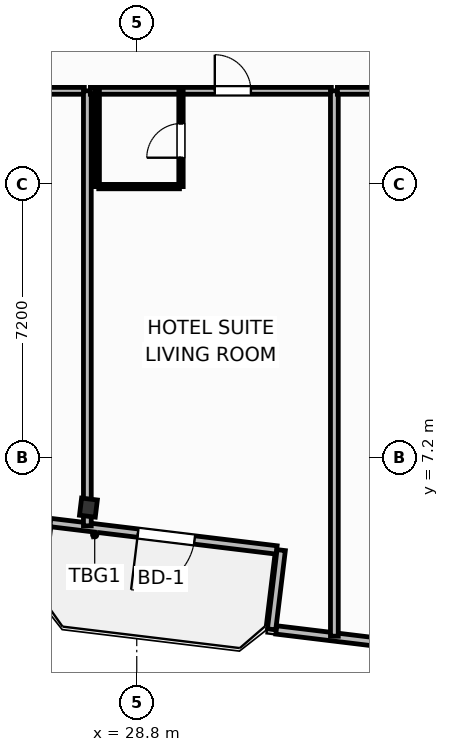
"""IFC4 building model, lengths in metres.
Left out: names, types, materials, properties, quantities, classifications, styles, units other than length and angle.
Written with IfcOpenShell. Run it as: python <this file> out.ifc"""

import sys

from ifc_helpers import new_model, si_unit, direction, frame, frame_2d, origin, origin_2d, place, context, subcontext, project, spatial, rectangle, i_section, extrude, element, fill, save


model = new_model("IFC4")
c1 = context("Model", 3, precision=1e-05, world=origin(), true_north=direction((0.0, 1.0)))
c2 = subcontext(c1, "Body", "Model", "MODEL_VIEW")
j1 = project(units=[si_unit("LENGTHUNIT", "METRE"), si_unit("PLANEANGLEUNIT", "RADIAN")], contexts=[c1])
p1 = place(None, origin())
s1 = spatial("IfcSite", under=j1, at=p1, CompositionType="ELEMENT")
p2 = place(p1, origin())
s2 = spatial("IfcBuilding", under=s1, at=p2, CompositionType="ELEMENT")
p3 = place(p2, frame((0.0, 0.0, 121.7)))
s3 = spatial("IfcBuildingStorey", under=s2, at=p3, CompositionType="ELEMENT", Elevation=121.7)
p4 = place(p3, frame((27.529, 5.884, 0.0), z_axis=(0.0, 0.0, 1.0), x_axis=(0.992732158755, -0.12034475881, 0.0)))
e1 = element("IfcColumn", 1, at=p4, inside=s3, PredefinedType="COLUMN", context=c2, shape_type="SweptSolid", body=[
    extrude(i_section(OverallWidth=0.418, OverallDepth=0.455, WebThickness=0.042, FlangeThickness=0.068, FilletRadius=0.025, at=origin_2d()), origin(), (0.0, 0.0, 1.0), 3.7),
])
p5 = place(p3, frame((32.48, 4.77, 0.0), z_axis=(0.0, 0.0, 1.0), x_axis=(-0.992735402148, 0.120318000826, 0.0)))
e2 = element("IfcWall", 2, at=p5, inside=s3, PredefinedType="SOLIDWALL", context=c2, shape_type="SweptSolid", body=[
    extrude(rectangle(XDim=6.0, YDim=0.22, at=frame_2d((3.0, 0.0))), origin(), (0.0, 0.0, 1.0), 2.73),
])
p6 = place(p5, frame((2.176, 0.0, 0.0)))
e3 = element("IfcOpeningElement", 3, at=p6, cuts=e2, PredefinedType="OPENING", context=c2, shape_type="SweptSolid", body=[
    extrude(rectangle(XDim=1.5, YDim=2.25, at=frame_2d((0.75, 1.125))), frame((0.0, 0.12, 0.0), z_axis=(0.0, -1.0, 0.0), x_axis=(1.0, 0.0, 0.0)), (0.0, 0.0, 1.0), 0.24),
])
p7 = place(p3, frame((32.601, 4.765, 0.0), z_axis=(0.0, 0.0, 1.0), x_axis=(-0.120327895535, -0.992734202874, 0.0)))
e4 = element("IfcWall", 4, at=p7, inside=s3, PredefinedType="SOLIDWALL", context=c2, shape_type="SweptSolid", body=[
    extrude(rectangle(XDim=2.1, YDim=0.22, at=frame_2d((1.05, 0.0))), origin(), (0.0, 0.0, 1.0), 2.73),
])
p8 = place(p3, frame((32.472, 2.665, 0.0), z_axis=(0.0, 0.0, 1.0), x_axis=(0.992734661931, -0.120324108143, 0.0)))
e5 = element("IfcWall", 5, at=p8, inside=s3, PredefinedType="SOLIDWALL", context=c2, shape_type="SweptSolid", body=[
    extrude(rectangle(XDim=8.035, YDim=0.22, at=frame_2d((4.018, 0.0))), origin(), (0.0, 0.0, 1.0), 2.73),
])
p9 = place(p8, frame((3.192, 0.0, 0.8)))
e6 = element("IfcOpeningElement", 6, at=p9, cuts=e5, PredefinedType="OPENING", context=c2, shape_type="SweptSolid", body=[
    extrude(rectangle(XDim=1.65, YDim=1.65, at=frame_2d((0.825, 0.825))), frame((0.0, 0.12, 0.0), z_axis=(0.0, -1.0, 0.0), x_axis=(1.0, 0.0, 0.0)), (0.0, 0.0, 1.0), 0.24),
])
p10 = place(p3, frame((21.08, 16.85, 0.0), z_axis=(0.0, 0.0, 1.0), x_axis=(1.0, 0.0, 0.0)))
e7 = element("IfcWall", 7, at=p10, inside=s3, PredefinedType="PARTITIONING", context=c2, shape_type="SweptSolid", body=[
    extrude(rectangle(XDim=6.34, YDim=0.18, at=frame_2d((3.17, 0.0))), origin(), (0.0, 0.0, 1.0), 3.45),
])
p11 = place(p10, frame((3.274, 0.0, 0.0)))
e8 = element("IfcOpeningElement", 8, at=p11, cuts=e7, PredefinedType="OPENING", context=c2, shape_type="SweptSolid", body=[
    extrude(rectangle(XDim=0.95, YDim=2.15, at=frame_2d((0.475, 1.075))), frame((0.0, 0.1, 0.0), z_axis=(0.0, -1.0, 0.0), x_axis=(1.0, 0.0, 0.0)), (0.0, 0.0, 1.0), 0.2),
])
p12 = place(p3, frame((27.5, 5.403, 0.0), z_axis=(0.0, 0.0, 1.0), x_axis=(0.0, 1.0, 0.0)))
e9 = element("IfcWall", 9, at=p12, inside=s3, PredefinedType="PARTITIONING", context=c2, shape_type="SweptSolid", body=[
    extrude(rectangle(XDim=11.447, YDim=0.205, at=frame_2d((5.723, 0.0))), origin(), (0.0, 0.0, 1.0), 2.662),
])
p13 = place(p3, frame((27.58, 16.85, 0.0), z_axis=(0.0, 0.0, 1.0), x_axis=(1.0, 0.0, 0.0)))
e10 = element("IfcWall", 10, at=p13, inside=s3, PredefinedType="PARTITIONING", context=c2, shape_type="SweptSolid", body=[
    extrude(rectangle(XDim=6.34, YDim=0.18, at=frame_2d((3.17, 0.0))), origin(), (0.0, 0.0, 1.0), 3.45),
])
p14 = place(p13, frame((3.274, 0.0, 0.0)))
e11 = element("IfcOpeningElement", 11, at=p14, cuts=e10, PredefinedType="OPENING", context=c2, shape_type="SweptSolid", body=[
    extrude(rectangle(XDim=0.95, YDim=2.15, at=frame_2d((0.475, 1.075))), frame((0.0, 0.1, 0.0), z_axis=(0.0, -1.0, 0.0), x_axis=(1.0, 0.0, 0.0)), (0.0, 0.0, 1.0), 0.2),
])
p15 = place(p3, frame((27.8, 14.33, 0.0), z_axis=(0.0, 0.0, 1.0), x_axis=(1.0, 0.0, 0.0)))
e12 = element("IfcWall", 12, at=p15, inside=s3, PredefinedType="PARTITIONING", context=c2, shape_type="SweptSolid", body=[
    extrude(rectangle(XDim=2.124, YDim=0.115, at=frame_2d((1.062, 0.0))), origin(), (0.0, 0.0, 1.0), 3.45),
])
p16 = place(p3, frame((29.964, 14.33, 0.0), z_axis=(0.0, 0.0, 1.0), x_axis=(0.0, 1.0, 0.0)))
e13 = element("IfcWall", 13, at=p16, inside=s3, PredefinedType="PARTITIONING", context=c2, shape_type="SweptSolid", body=[
    extrude(rectangle(XDim=2.52, YDim=0.115, at=frame_2d((1.26, 0.0))), origin(), (0.0, 0.0, 1.0), 3.45),
])
p17 = place(p16, frame((0.76, 0.0, 0.0)))
e14 = element("IfcOpeningElement", 14, at=p17, cuts=e13, PredefinedType="OPENING", context=c2, shape_type="SweptSolid", body=[
    extrude(rectangle(XDim=0.9, YDim=2.05, at=frame_2d((0.45, 1.025))), frame((0.0, 0.067, 0.0), z_axis=(0.0, -1.0, 0.0), x_axis=(1.0, 0.0, 0.0)), (0.0, 0.0, 1.0), 0.135),
])
p18 = place(p3, frame((27.76, 14.33, 0.0), z_axis=(0.0, 0.0, 1.0), x_axis=(0.0, 1.0, 0.0)))
e15 = element("IfcWall", 15, at=p18, inside=s3, PredefinedType="PARTITIONING", context=c2, shape_type="SweptSolid", body=[
    extrude(rectangle(XDim=2.52, YDim=0.115, at=frame_2d((1.26, 0.0))), origin(), (0.0, 0.0, 1.0), 3.45),
])
p19 = place(p3, frame((34.0, 2.5, 0.0), z_axis=(0.0, 0.0, 1.0), x_axis=(0.0, 1.0, 0.0)))
e16 = element("IfcWall", 16, at=p19, inside=s3, PredefinedType="PARTITIONING", context=c2, shape_type="SweptSolid", body=[
    extrude(rectangle(XDim=14.35, YDim=0.205, at=frame_2d((7.175, 0.0))), origin(), (0.0, 0.0, 1.0), 3.45),
])
p20 = place(p3, frame((34.08, 16.85, 0.0), z_axis=(0.0, 0.0, 1.0), x_axis=(1.0, 0.0, 0.0)))
e17 = element("IfcWall", 17, at=p20, inside=s3, PredefinedType="PARTITIONING", context=c2, shape_type="SweptSolid", body=[
    extrude(rectangle(XDim=6.34, YDim=0.18, at=frame_2d((3.17, 0.0))), origin(), (0.0, 0.0, 1.0), 3.45),
])
p21 = place(p20, frame((0.91, 0.0, 0.0)))
e18 = element("IfcOpeningElement", 18, at=p21, cuts=e17, PredefinedType="OPENING", context=c2, shape_type="SweptSolid", body=[
    extrude(rectangle(XDim=0.95, YDim=2.15, at=frame_2d((0.475, 1.075))), frame((0.0, 0.1, 0.0), z_axis=(0.0, -1.0, 0.0), x_axis=(1.0, 0.0, 0.0)), (0.0, 0.0, 1.0), 0.2),
])
p22 = place(p6, origin())
e19 = element("IfcDoor", 19, at=p22, inside=s3, OperationType="SINGLE_SWING_RIGHT", PredefinedType="DOOR", context=c2, shape_type="SweptSolid", body=[
    extrude(rectangle(XDim=1.5, YDim=2.25, at=frame_2d((0.75, 1.125))), frame((0.0, 0.025, 0.0), z_axis=(0.0, -1.0, 0.0), x_axis=(1.0, 0.0, 0.0)), (0.0, 0.0, 1.0), 0.05),
])
fill(e3, e19)
p23 = place(p14, origin())
e20 = element("IfcDoor", 20, at=p23, inside=s3, OperationType="SINGLE_SWING_LEFT", PredefinedType="DOOR", context=c2, shape_type="SweptSolid", body=[
    extrude(rectangle(XDim=0.95, YDim=2.15, at=frame_2d((0.475, 1.075))), frame((0.0, 0.025, 0.0), z_axis=(0.0, -1.0, 0.0), x_axis=(1.0, 0.0, 0.0)), (0.0, 0.0, 1.0), 0.05),
])
fill(e11, e20)
p24 = place(p17, origin())
e21 = element("IfcDoor", 21, at=p24, inside=s3, OperationType="SINGLE_SWING_LEFT", PredefinedType="DOOR", context=c2, shape_type="SweptSolid", body=[
    extrude(rectangle(XDim=0.9, YDim=2.05, at=frame_2d((0.45, 1.025))), frame((0.0, 0.025, 0.0), z_axis=(0.0, -1.0, 0.0), x_axis=(1.0, 0.0, 0.0)), (0.0, 0.0, 1.0), 0.05),
])
fill(e14, e21)
save(model, sys.argv[1])
